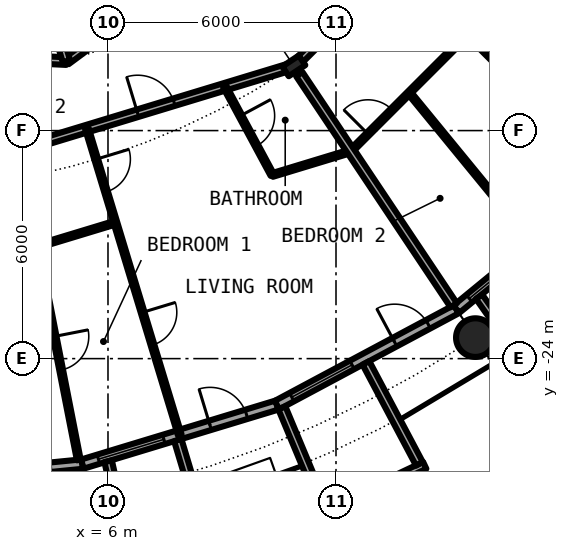
"""IFC4 building model, lengths in metres.
Left out: names, types, materials, properties, quantities, classifications, styles, units other than length and angle.
Written with IfcOpenShell. Run it as: python <this file> out.ifc"""

import sys

from ifc_helpers import new_model, si_unit, direction, frame, frame_2d, origin, origin_2d, place, context, subcontext, project, spatial, rectangle, circle, hollow_circle, i_section, extrude, element, fill, save


model = new_model("IFC4")
c1 = context("Model", 3, precision=1e-05, world=origin(), true_north=direction((0.0, 1.0)))
c2 = subcontext(c1, "Body", "Model", "MODEL_VIEW")
j1 = project(units=[si_unit("LENGTHUNIT", "METRE"), si_unit("PLANEANGLEUNIT", "RADIAN")], contexts=[c1])
p1 = place(None, origin())
s1 = spatial("IfcSite", under=j1, at=p1, CompositionType="ELEMENT")
p2 = place(p1, origin())
s2 = spatial("IfcBuilding", under=s1, at=p2, CompositionType="ELEMENT")
p3 = place(p2, frame((0.0, 0.0, 72.75)))
s3 = spatial("IfcBuildingStorey", under=s2, at=p3, CompositionType="ELEMENT", Elevation=72.75)
p4 = place(p3, frame((15.667, -23.448, 0.0), z_axis=(0.0, 0.0, 1.0), x_axis=(1.0, 0.0, 0.0)))
e1 = element("IfcColumn", 1, at=p4, inside=s3, PredefinedType="COLUMN", context=c2, shape_type="SweptSolid", body=[
    extrude(hollow_circle(Radius=0.508, WallThickness=0.04, at=origin_2d()), origin(), (0.0, 0.0, 1.0), 3.05),
])
p5 = place(p3, frame((10.889, -16.297, 0.0), z_axis=(0.0, 0.0, 1.0), x_axis=(0.55557023302, -0.831469612303, 0.0)))
e2 = element("IfcColumn", 2, at=p5, inside=s3, PredefinedType="COLUMN", context=c2, shape_type="SweptSolid", body=[
    extrude(i_section(OverallWidth=0.306, OverallDepth=0.524, WebThickness=0.021, FlangeThickness=0.04, FilletRadius=0.027, at=origin_2d()), origin(), (0.0, 0.0, 1.0), 3.05),
])
p6 = place(p3, frame((0.0, -27.3, 0.0), z_axis=(0.0, 0.0, 1.0), x_axis=(0.995173996315, 0.098126026407, 0.0)))
e3 = element("IfcWall", 3, at=p6, inside=s3, PredefinedType="SOLIDWALL", context=c2, shape_type="SweptSolid", body=[
    extrude(rectangle(XDim=5.352, YDim=0.25, at=frame_2d((2.676, 0.0))), origin(), (0.0, 0.0, 1.0), 2.7),
])
p7 = place(p6, frame((0.441, 0.0, 0.3)))
e4 = element("IfcOpeningElement", 4, at=p7, cuts=e3, PredefinedType="OPENING", context=c2, shape_type="SweptSolid", body=[
    extrude(rectangle(XDim=1.8, YDim=2.1, at=frame_2d((0.9, 1.05))), frame((0.0, 0.135, 0.0), z_axis=(0.0, -1.0, 0.0), x_axis=(1.0, 0.0, 0.0)), (0.0, 0.0, 1.0), 0.27),
])
p8 = place(p6, frame((3.51, 0.0, 0.0)))
e5 = element("IfcOpeningElement", 5, at=p8, cuts=e3, PredefinedType="OPENING", context=c2, shape_type="SweptSolid", body=[
    extrude(rectangle(XDim=1.0, YDim=2.2, at=frame_2d((0.5, 1.1))), frame((0.0, 0.135, 0.0), z_axis=(0.0, -1.0, 0.0), x_axis=(1.0, 0.0, 0.0)), (0.0, 0.0, 1.0), 0.27),
])
p9 = place(p3, frame((5.326, -26.775, 0.0), z_axis=(0.0, 0.0, 1.0), x_axis=(0.956965678721, 0.290201119486, 0.0)))
e6 = element("IfcWall", 6, at=p9, inside=s3, PredefinedType="SOLIDWALL", context=c2, shape_type="SweptSolid", body=[
    extrude(rectangle(XDim=5.351, YDim=0.25, at=frame_2d((2.676, 0.0))), origin(), (0.0, 0.0, 1.0), 2.7),
])
p10 = place(p9, frame((0.441, 0.0, 0.3)))
e7 = element("IfcOpeningElement", 7, at=p10, cuts=e6, PredefinedType="OPENING", context=c2, shape_type="SweptSolid", body=[
    extrude(rectangle(XDim=1.8, YDim=2.1, at=frame_2d((0.9, 1.05))), frame((0.0, 0.135, 0.0), z_axis=(0.0, -1.0, 0.0), x_axis=(1.0, 0.0, 0.0)), (0.0, 0.0, 1.0), 0.27),
])
p11 = place(p9, frame((3.51, 0.0, 0.0)))
e8 = element("IfcOpeningElement", 8, at=p11, cuts=e6, PredefinedType="OPENING", context=c2, shape_type="SweptSolid", body=[
    extrude(rectangle(XDim=1.0, YDim=2.2, at=frame_2d((0.5, 1.1))), frame((0.0, 0.135, 0.0), z_axis=(0.0, -1.0, 0.0), x_axis=(1.0, 0.0, 0.0)), (0.0, 0.0, 1.0), 0.27),
])
p12 = place(p3, frame((6.004, -26.7, -0.03), z_axis=(0.0, 0.0, 1.0), x_axis=(0.219609259383, -0.975587911566, 0.0)))
e9 = element("IfcWall", 9, at=p12, inside=s3, PredefinedType="SOLIDWALL", context=c2, shape_type="SweptSolid", body=[
    extrude(rectangle(XDim=2.933, YDim=0.2, at=frame_2d((1.466, 0.0))), origin(), (0.0, 0.0, 1.0), 2.73),
])
p13 = place(p3, frame((7.837, -26.144, -0.03), z_axis=(0.0, 0.0, 1.0), x_axis=(0.287064767992, -0.957911174889, 0.0)))
e10 = element("IfcWall", 10, at=p13, inside=s3, PredefinedType="SOLIDWALL", context=c2, shape_type="SweptSolid", body=[
    extrude(rectangle(XDim=3.006, YDim=0.2, at=frame_2d((1.503, 0.0))), origin(), (0.0, 0.0, 1.0), 2.73),
])
p14 = place(p3, frame((10.447, -25.222, 0.0), z_axis=(0.0, 0.0, 1.0), x_axis=(0.881915646801, 0.471407246368, 0.0)))
e11 = element("IfcWall", 11, at=p14, inside=s3, PredefinedType="SOLIDWALL", context=c2, shape_type="SweptSolid", body=[
    extrude(rectangle(XDim=5.352, YDim=0.25, at=frame_2d((2.676, 0.0))), origin(), (0.0, 0.0, 1.0), 2.7),
])
p15 = place(p14, frame((0.441, 0.0, 0.3)))
e12 = element("IfcOpeningElement", 12, at=p15, cuts=e11, PredefinedType="OPENING", context=c2, shape_type="SweptSolid", body=[
    extrude(rectangle(XDim=1.8, YDim=2.1, at=frame_2d((0.9, 1.05))), frame((0.0, 0.135, 0.0), z_axis=(0.0, -1.0, 0.0), x_axis=(1.0, 0.0, 0.0)), (0.0, 0.0, 1.0), 0.27),
])
p16 = place(p14, frame((3.51, 0.0, 0.0)))
e13 = element("IfcOpeningElement", 13, at=p16, cuts=e11, PredefinedType="OPENING", context=c2, shape_type="SweptSolid", body=[
    extrude(rectangle(XDim=1.0, YDim=2.2, at=frame_2d((0.5, 1.1))), frame((0.0, 0.135, 0.0), z_axis=(0.0, -1.0, 0.0), x_axis=(1.0, 0.0, 0.0)), (0.0, 0.0, 1.0), 0.27),
])
p17 = place(p3, frame((11.629, -28.088, -0.03), z_axis=(0.0, 0.0, 1.0), x_axis=(0.904000060331, 0.427532327342, 0.0)))
e14 = element("IfcWall", 14, at=p17, inside=s3, PredefinedType="SOLIDWALL", context=c2, shape_type="SweptSolid", body=[
    extrude(rectangle(XDim=2.993, YDim=0.2, at=frame_2d((1.497, 0.0))), origin(), (0.0, 0.0, 1.0), 2.73),
])
p18 = place(p17, frame((0.457, 0.0, 0.33)))
e15 = element("IfcOpeningElement", 15, at=p18, cuts=e14, PredefinedType="OPENING", context=c2, shape_type="SweptSolid", body=[
    extrude(circle(Radius=1.04, at=frame_2d((1.04, 1.04))), frame((0.0, 0.11, 0.0), z_axis=(0.0, -1.0, 0.0), x_axis=(1.0, 0.0, 0.0)), (0.0, 0.0, 1.0), 0.22),
])
p19 = place(p3, frame((10.575, -25.295, -0.03), z_axis=(0.0, 0.0, 1.0), x_axis=(0.385697364644, -0.922625353492, 0.0)))
e16 = element("IfcWall", 16, at=p19, inside=s3, PredefinedType="SOLIDWALL", context=c2, shape_type="SweptSolid", body=[
    extrude(rectangle(XDim=2.883, YDim=0.2, at=frame_2d((1.442, 0.0))), origin(), (0.0, 0.0, 1.0), 2.73),
])
p20 = place(p3, frame((12.787, -24.113, -0.03), z_axis=(0.0, 0.0, 1.0), x_axis=(0.468365282436, -0.883534924159, 0.0)))
e17 = element("IfcWall", 17, at=p20, inside=s3, PredefinedType="SOLIDWALL", context=c2, shape_type="SweptSolid", body=[
    extrude(rectangle(XDim=3.006, YDim=0.2, at=frame_2d((1.503, 0.0))), origin(), (0.0, 0.0, 1.0), 2.73),
])
p21 = place(p3, frame((15.167, -22.699, 0.0), z_axis=(0.0, 0.0, 1.0), x_axis=(0.773019449054, 0.634382322723, 0.0)))
e18 = element("IfcWall", 18, at=p21, inside=s3, PredefinedType="SOLIDWALL", context=c2, shape_type="SweptSolid", body=[
    extrude(rectangle(XDim=5.352, YDim=0.25, at=frame_2d((2.676, 0.0))), origin(), (0.0, 0.0, 1.0), 2.7),
])
p22 = place(p21, frame((0.441, 0.0, 0.3)))
e19 = element("IfcOpeningElement", 19, at=p22, cuts=e18, PredefinedType="OPENING", context=c2, shape_type="SweptSolid", body=[
    extrude(rectangle(XDim=1.8, YDim=2.1, at=frame_2d((0.9, 1.05))), frame((0.0, 0.135, 0.0), z_axis=(0.0, -1.0, 0.0), x_axis=(1.0, 0.0, 0.0)), (0.0, 0.0, 1.0), 0.27),
])
p23 = place(p21, frame((3.51, 0.0, 0.0)))
e20 = element("IfcOpeningElement", 20, at=p23, cuts=e18, PredefinedType="OPENING", context=c2, shape_type="SweptSolid", body=[
    extrude(rectangle(XDim=1.0, YDim=2.2, at=frame_2d((0.5, 1.1))), frame((0.0, 0.135, 0.0), z_axis=(0.0, -1.0, 0.0), x_axis=(1.0, 0.0, 0.0)), (0.0, 0.0, 1.0), 0.27),
])
p24 = place(p3, frame((15.765, -22.37, -0.03), z_axis=(0.0, 0.0, 1.0), x_axis=(0.576274612209, -0.817256123454, 0.0)))
e21 = element("IfcWall", 21, at=p24, inside=s3, PredefinedType="SOLIDWALL", context=c2, shape_type="SweptSolid", body=[
    extrude(rectangle(XDim=2.933, YDim=0.2, at=frame_2d((1.466, 0.0))), origin(), (0.0, 0.0, 1.0), 2.73),
])
p25 = place(p3, frame((12.386, -18.545, 0.0), z_axis=(0.0, 0.0, 1.0), x_axis=(0.707106781187, 0.707106781187, 0.0)))
e22 = element("IfcWall", 22, at=p25, inside=s3, PredefinedType="PARTITIONING", context=c2, shape_type="SweptSolid", body=[
    extrude(rectangle(XDim=4.351, YDim=0.1, at=frame_2d((2.176, 0.0))), origin(), (0.0, 0.0, 1.0), 2.7),
])
p26 = place(p25, frame((0.644, 0.0, 0.0)))
e23 = element("IfcOpeningElement", 23, at=p26, cuts=e22, PredefinedType="OPENING", context=c2, shape_type="SweptSolid", body=[
    extrude(rectangle(XDim=0.9, YDim=2.3, at=frame_2d((0.45, 1.15))), frame((0.0, 0.06, 0.0), z_axis=(0.0, -1.0, 0.0), x_axis=(1.0, 0.0, 0.0)), (0.0, 0.0, 1.0), 0.12),
])
p27 = place(p3, frame((0.0, -22.3, 0.0), z_axis=(0.0, 0.0, 1.0), x_axis=(0.956940987612, 0.290282528286, 0.0)))
e24 = element("IfcWall", 24, at=p27, inside=s3, PredefinedType="PARTITIONING", context=c2, shape_type="SweptSolid", body=[
    extrude(rectangle(XDim=6.477, YDim=0.1, at=frame_2d((3.238, 0.0))), origin(), (0.0, 0.0, 1.0), 2.7),
])
p28 = place(p3, frame((10.327, -19.168, 0.0), z_axis=(0.0, 0.0, 1.0), x_axis=(0.956877769253, 0.290490851335, 0.0)))
e25 = element("IfcWall", 25, at=p28, inside=s3, PredefinedType="PARTITIONING", context=c2, shape_type="SweptSolid", body=[
    extrude(rectangle(XDim=2.158, YDim=0.1, at=frame_2d((1.079, 0.0))), origin(), (0.0, 0.0, 1.0), 2.7),
])
p29 = place(p3, frame((11.0, -16.186, 0.0), z_axis=(0.0, 0.0, 1.0), x_axis=(0.707106781187, 0.707106781187, 0.0)))
e26 = element("IfcWall", 26, at=p29, inside=s3, PredefinedType="PARTITIONING", context=c2, shape_type="SweptSolid", body=[
    extrude(rectangle(XDim=7.334, YDim=0.2, at=frame_2d((3.667, 0.0))), origin(), (0.0, 0.0, 1.0), 2.38),
])
p30 = place(p29, frame((2.211, 0.0, 0.0)))
e27 = element("IfcOpeningElement", 27, at=p30, cuts=e26, PredefinedType="OPENING", context=c2, shape_type="SweptSolid", body=[
    extrude(rectangle(XDim=1.0, YDim=2.3, at=frame_2d((0.5, 1.15))), frame((0.0, 0.11, 0.0), z_axis=(0.0, -1.0, 0.0), x_axis=(1.0, 0.0, 0.0)), (0.0, 0.0, 1.0), 0.22),
])
p31 = place(p3, frame((0.0, -19.6, 0.0), z_axis=(0.0, 0.0, 1.0), x_axis=(0.956932298225, 0.290311172044, 0.0)))
e28 = element("IfcWall", 28, at=p31, inside=s3, PredefinedType="PARTITIONING", context=c2, shape_type="SweptSolid", body=[
    extrude(rectangle(XDim=11.219, YDim=0.2, at=frame_2d((5.61, 0.0))), origin(), (0.0, 0.0, 1.0), 2.38),
])
p32 = place(p31, frame((7.086, 0.0, 0.0)))
e29 = element("IfcOpeningElement", 29, at=p32, cuts=e28, PredefinedType="OPENING", context=c2, shape_type="SweptSolid", body=[
    extrude(rectangle(XDim=1.0, YDim=2.3, at=frame_2d((0.5, 1.15))), frame((0.0, 0.11, 0.0), z_axis=(0.0, -1.0, 0.0), x_axis=(1.0, 0.0, 0.0)), (0.0, 0.0, 1.0), 0.22),
])
p33 = place(p3, frame((-6.469, -15.614, 0.0), z_axis=(0.0, 0.0, 1.0), x_axis=(0.998798520108, -0.049005267363, 0.0)))
e30 = element("IfcWall", 30, at=p33, inside=s3, PredefinedType="PARTITIONING", context=c2, shape_type="SweptSolid", body=[
    extrude(rectangle(XDim=11.389, YDim=0.2, at=frame_2d((5.694, 0.0))), origin(), (0.0, 0.0, 1.0), 2.7),
])
p34 = place(p33, frame((4.383, 0.0, 0.0)))
e31 = element("IfcOpeningElement", 31, at=p34, cuts=e30, PredefinedType="OPENING", context=c2, shape_type="SweptSolid", body=[
    extrude(rectangle(XDim=1.0, YDim=2.3, at=frame_2d((0.5, 1.15))), frame((0.0, 0.11, 0.0), z_axis=(0.0, -1.0, 0.0), x_axis=(1.0, 0.0, 0.0)), (0.0, 0.0, 1.0), 0.22),
])
p35 = place(p3, frame((4.906, -16.172, 0.0), z_axis=(0.0, 0.0, 1.0), x_axis=(0.803204584823, 0.59570327758, 0.0)))
e32 = element("IfcWall", 32, at=p35, inside=s3, PredefinedType="PARTITIONING", context=c2, shape_type="SweptSolid", body=[
    extrude(rectangle(XDim=11.387, YDim=0.2, at=frame_2d((5.693, 0.0))), origin(), (0.0, 0.0, 1.0), 2.7),
])
p36 = place(p35, frame((4.38, 0.0, 0.0)))
e33 = element("IfcOpeningElement", 33, at=p36, cuts=e32, PredefinedType="OPENING", context=c2, shape_type="SweptSolid", body=[
    extrude(rectangle(XDim=1.0, YDim=2.3, at=frame_2d((0.5, 1.15))), frame((0.0, 0.11, 0.0), z_axis=(0.0, -1.0, 0.0), x_axis=(1.0, 0.0, 0.0)), (0.0, 0.0, 1.0), 0.22),
])
p37 = place(p3, frame((2.242, -7.388, 0.0), z_axis=(0.0, 0.0, 1.0), x_axis=(0.290225889812, -0.956958166736, 0.0)))
e34 = element("IfcWall", 34, at=p37, inside=s3, PredefinedType="PARTITIONING", context=c2, shape_type="SweptSolid", body=[
    extrude(rectangle(XDim=9.179, YDim=0.2, at=frame_2d((4.59, 0.0))), origin(), (0.0, 0.0, 1.0), 2.7),
])
p38 = place(p3, frame((4.13, -21.047, 0.0), z_axis=(0.0, 0.0, 1.0), x_axis=(0.192433779325, -0.981309961518, 0.0)))
e35 = element("IfcWall", 35, at=p38, inside=s3, PredefinedType="PARTITIONING", context=c2, shape_type="SweptSolid", body=[
    extrude(rectangle(XDim=5.727, YDim=0.1, at=frame_2d((2.863, 0.0))), origin(), (0.0, 0.0, 1.0), 2.7),
])
p39 = place(p38, frame((2.414, 0.0, 0.0)))
e36 = element("IfcOpeningElement", 36, at=p39, cuts=e35, PredefinedType="OPENING", context=c2, shape_type="SweptSolid", body=[
    extrude(rectangle(XDim=0.9, YDim=2.3, at=frame_2d((0.45, 1.15))), frame((0.0, 0.06, 0.0), z_axis=(0.0, -1.0, 0.0), x_axis=(1.0, 0.0, 0.0)), (0.0, 0.0, 1.0), 0.12),
])
p40 = place(p3, frame((5.445, -17.948, 0.0), z_axis=(0.0, 0.0, 1.0), x_axis=(0.290158700753, -0.956978541231, 0.0)))
e37 = element("IfcWall", 37, at=p40, inside=s3, PredefinedType="PARTITIONING", context=c2, shape_type="SweptSolid", body=[
    extrude(rectangle(XDim=8.419, YDim=0.1, at=frame_2d((4.209, 0.0))), origin(), (0.0, 0.0, 1.0), 2.7),
])
p41 = place(p40, frame((0.842, 0.0, 0.0)))
e38 = element("IfcOpeningElement", 38, at=p41, cuts=e37, PredefinedType="OPENING", context=c2, shape_type="SweptSolid", body=[
    extrude(rectangle(XDim=0.9, YDim=2.3, at=frame_2d((0.45, 1.15))), frame((0.0, 0.06, 0.0), z_axis=(0.0, -1.0, 0.0), x_axis=(1.0, 0.0, 0.0)), (0.0, 0.0, 1.0), 0.12),
])
p42 = place(p40, frame((5.052, 0.0, 0.0)))
e39 = element("IfcOpeningElement", 39, at=p42, cuts=e37, PredefinedType="OPENING", context=c2, shape_type="SweptSolid", body=[
    extrude(rectangle(XDim=0.9, YDim=2.3, at=frame_2d((0.45, 1.15))), frame((0.0, 0.06, 0.0), z_axis=(0.0, -1.0, 0.0), x_axis=(1.0, 0.0, 0.0)), (0.0, 0.0, 1.0), 0.12),
])
p43 = place(p3, frame((9.074, -16.847, 0.0), z_axis=(0.0, 0.0, 1.0), x_axis=(0.474160570331, -0.880438387136, 0.0)))
e40 = element("IfcWall", 40, at=p43, inside=s3, PredefinedType="PARTITIONING", context=c2, shape_type="SweptSolid", body=[
    extrude(rectangle(XDim=2.636, YDim=0.1, at=frame_2d((1.318, 0.0))), origin(), (0.0, 0.0, 1.0), 2.7),
])
p44 = place(p43, frame((0.868, 0.0, 0.0)))
e41 = element("IfcOpeningElement", 41, at=p44, cuts=e40, PredefinedType="OPENING", context=c2, shape_type="SweptSolid", body=[
    extrude(rectangle(XDim=0.9, YDim=2.3, at=frame_2d((0.45, 1.15))), frame((0.0, 0.06, 0.0), z_axis=(0.0, -1.0, 0.0), x_axis=(1.0, 0.0, 0.0)), (0.0, 0.0, 1.0), 0.12),
])
p45 = place(p3, frame((11.034, -16.515, 0.0), z_axis=(0.0, 0.0, 1.0), x_axis=(0.555701298605, -0.831382022135, 0.0)))
e42 = element("IfcWall", 42, at=p45, inside=s3, PredefinedType="PARTITIONING", context=c2, shape_type="SweptSolid", body=[
    extrude(rectangle(XDim=7.313, YDim=0.2, at=frame_2d((3.657, 0.0))), origin(), (0.0, 0.0, 1.0), 2.7),
])
p46 = place(p3, frame((13.927, -17.004, 0.0), z_axis=(0.0, 0.0, 1.0), x_axis=(0.633774976367, -0.773517471898, 0.0)))
e43 = element("IfcWall", 43, at=p46, inside=s3, PredefinedType="PARTITIONING", context=c2, shape_type="SweptSolid", body=[
    extrude(rectangle(XDim=5.196, YDim=0.1, at=frame_2d((2.598, 0.0))), origin(), (0.0, 0.0, 1.0), 2.7),
])
p47 = place(p3, frame((15.465, -15.465, 0.0), z_axis=(0.0, 0.0, 1.0), x_axis=(0.707106781187, -0.707106781187, 0.0)))
e44 = element("IfcWall", 44, at=p47, inside=s3, PredefinedType="PARTITIONING", context=c2, shape_type="SweptSolid", body=[
    extrude(rectangle(XDim=5.305, YDim=0.1, at=frame_2d((2.652, 0.0))), origin(), (0.0, 0.0, 1.0), 2.7),
])
p48 = place(p47, frame((2.202, 0.0, 0.0)))
e45 = element("IfcOpeningElement", 45, at=p48, cuts=e44, PredefinedType="OPENING", context=c2, shape_type="SweptSolid", body=[
    extrude(rectangle(XDim=0.9, YDim=2.3, at=frame_2d((0.45, 1.15))), frame((0.0, 0.06, 0.0), z_axis=(0.0, -1.0, 0.0), x_axis=(1.0, 0.0, 0.0)), (0.0, 0.0, 1.0), 0.12),
])
p49 = place(p10, origin())
e46 = element("IfcWindow", 46, at=p49, inside=s3, PartitioningType="SINGLE_PANEL", PredefinedType="WINDOW", context=c2, shape_type="SweptSolid", body=[
    extrude(rectangle(XDim=1.8, YDim=2.1, at=frame_2d((0.9, 1.05))), frame((0.0, 0.03, 0.0), z_axis=(0.0, -1.0, 0.0), x_axis=(1.0, 0.0, 0.0)), (0.0, 0.0, 1.0), 0.06),
])
fill(e7, e46)
p50 = place(p11, origin())
e47 = element("IfcDoor", 47, at=p50, inside=s3, OperationType="SINGLE_SWING_LEFT", PredefinedType="DOOR", context=c2, shape_type="SweptSolid", body=[
    extrude(rectangle(XDim=1.0, YDim=2.2, at=frame_2d((0.5, 1.1))), frame((0.0, 0.025, 0.0), z_axis=(0.0, -1.0, 0.0), x_axis=(1.0, 0.0, 0.0)), (0.0, 0.0, 1.0), 0.05),
])
fill(e8, e47)
p51 = place(p15, origin())
e48 = element("IfcWindow", 48, at=p51, inside=s3, PartitioningType="SINGLE_PANEL", PredefinedType="WINDOW", context=c2, shape_type="SweptSolid", body=[
    extrude(rectangle(XDim=1.8, YDim=2.1, at=frame_2d((0.9, 1.05))), frame((0.0, 0.03, 0.0), z_axis=(0.0, -1.0, 0.0), x_axis=(1.0, 0.0, 0.0)), (0.0, 0.0, 1.0), 0.06),
])
fill(e12, e48)
p52 = place(p18, origin())
e49 = element("IfcWindow", 49, at=p52, inside=s3, PartitioningType="SINGLE_PANEL", PredefinedType="WINDOW", context=c2, shape_type="SweptSolid", body=[
    extrude(circle(Radius=1.04, at=frame_2d((1.04, 1.04))), frame((0.0, 0.03, 0.0), z_axis=(0.0, -1.0, 0.0), x_axis=(1.0, 0.0, 0.0)), (0.0, 0.0, 1.0), 0.06),
])
fill(e15, e49)
p53 = place(p16, origin())
e50 = element("IfcDoor", 50, at=p53, inside=s3, OperationType="SINGLE_SWING_LEFT", PredefinedType="DOOR", context=c2, shape_type="SweptSolid", body=[
    extrude(rectangle(XDim=1.0, YDim=2.2, at=frame_2d((0.5, 1.1))), frame((0.0, 0.025, 0.0), z_axis=(0.0, -1.0, 0.0), x_axis=(1.0, 0.0, 0.0)), (0.0, 0.0, 1.0), 0.05),
])
fill(e13, e50)
p54 = place(p22, origin())
e51 = element("IfcWindow", 51, at=p54, inside=s3, PartitioningType="SINGLE_PANEL", PredefinedType="WINDOW", context=c2, shape_type="SweptSolid", body=[
    extrude(rectangle(XDim=1.8, YDim=2.1, at=frame_2d((0.9, 1.05))), frame((0.0, 0.03, 0.0), z_axis=(0.0, -1.0, 0.0), x_axis=(1.0, 0.0, 0.0)), (0.0, 0.0, 1.0), 0.06),
])
fill(e19, e51)
p55 = place(p32, origin())
e52 = element("IfcDoor", 52, at=p55, inside=s3, OperationType="SINGLE_SWING_RIGHT", PredefinedType="DOOR", context=c2, shape_type="SweptSolid", body=[
    extrude(rectangle(XDim=1.0, YDim=2.3, at=frame_2d((0.5, 1.15))), frame((0.0, 0.025, 0.0), z_axis=(0.0, -1.0, 0.0), x_axis=(1.0, 0.0, 0.0)), (0.0, 0.0, 1.0), 0.05),
])
fill(e29, e52)
p56 = place(p44, origin())
e53 = element("IfcDoor", 53, at=p56, inside=s3, OperationType="SINGLE_SWING_RIGHT", PredefinedType="DOOR", context=c2, shape_type="SweptSolid", body=[
    extrude(rectangle(XDim=0.9, YDim=2.3, at=frame_2d((0.45, 1.15))), frame((0.0, 0.025, 0.0), z_axis=(0.0, -1.0, 0.0), x_axis=(1.0, 0.0, 0.0)), (0.0, 0.0, 1.0), 0.05),
])
fill(e41, e53)
p57 = place(p41, origin())
e54 = element("IfcDoor", 54, at=p57, inside=s3, OperationType="SINGLE_SWING_LEFT", PredefinedType="DOOR", context=c2, shape_type="SweptSolid", body=[
    extrude(rectangle(XDim=0.9, YDim=2.3, at=frame_2d((0.45, 1.15))), frame((0.0, 0.025, 0.0), z_axis=(0.0, -1.0, 0.0), x_axis=(1.0, 0.0, 0.0)), (0.0, 0.0, 1.0), 0.05),
])
fill(e38, e54)
p58 = place(p42, origin())
e55 = element("IfcDoor", 55, at=p58, inside=s3, OperationType="SINGLE_SWING_RIGHT", PredefinedType="DOOR", context=c2, shape_type="SweptSolid", body=[
    extrude(rectangle(XDim=0.9, YDim=2.3, at=frame_2d((0.45, 1.15))), frame((0.0, 0.025, 0.0), z_axis=(0.0, -1.0, 0.0), x_axis=(1.0, 0.0, 0.0)), (0.0, 0.0, 1.0), 0.05),
])
fill(e39, e55)
p59 = place(p39, origin())
e56 = element("IfcDoor", 56, at=p59, inside=s3, OperationType="SINGLE_SWING_RIGHT", PredefinedType="DOOR", context=c2, shape_type="SweptSolid", body=[
    extrude(rectangle(XDim=0.9, YDim=2.3, at=frame_2d((0.45, 1.15))), frame((0.0, 0.025, 0.0), z_axis=(0.0, -1.0, 0.0), x_axis=(1.0, 0.0, 0.0)), (0.0, 0.0, 1.0), 0.05),
])
fill(e36, e56)
p60 = place(p26, origin())
e57 = element("IfcDoor", 57, at=p60, inside=s3, OperationType="SINGLE_SWING_LEFT", PredefinedType="DOOR", context=c2, shape_type="SweptSolid", body=[
    extrude(rectangle(XDim=0.9, YDim=2.3, at=frame_2d((0.45, 1.15))), frame((0.0, 0.025, 0.0), z_axis=(0.0, -1.0, 0.0), x_axis=(1.0, 0.0, 0.0)), (0.0, 0.0, 1.0), 0.05),
])
fill(e23, e57)
save(model, sys.argv[1])
